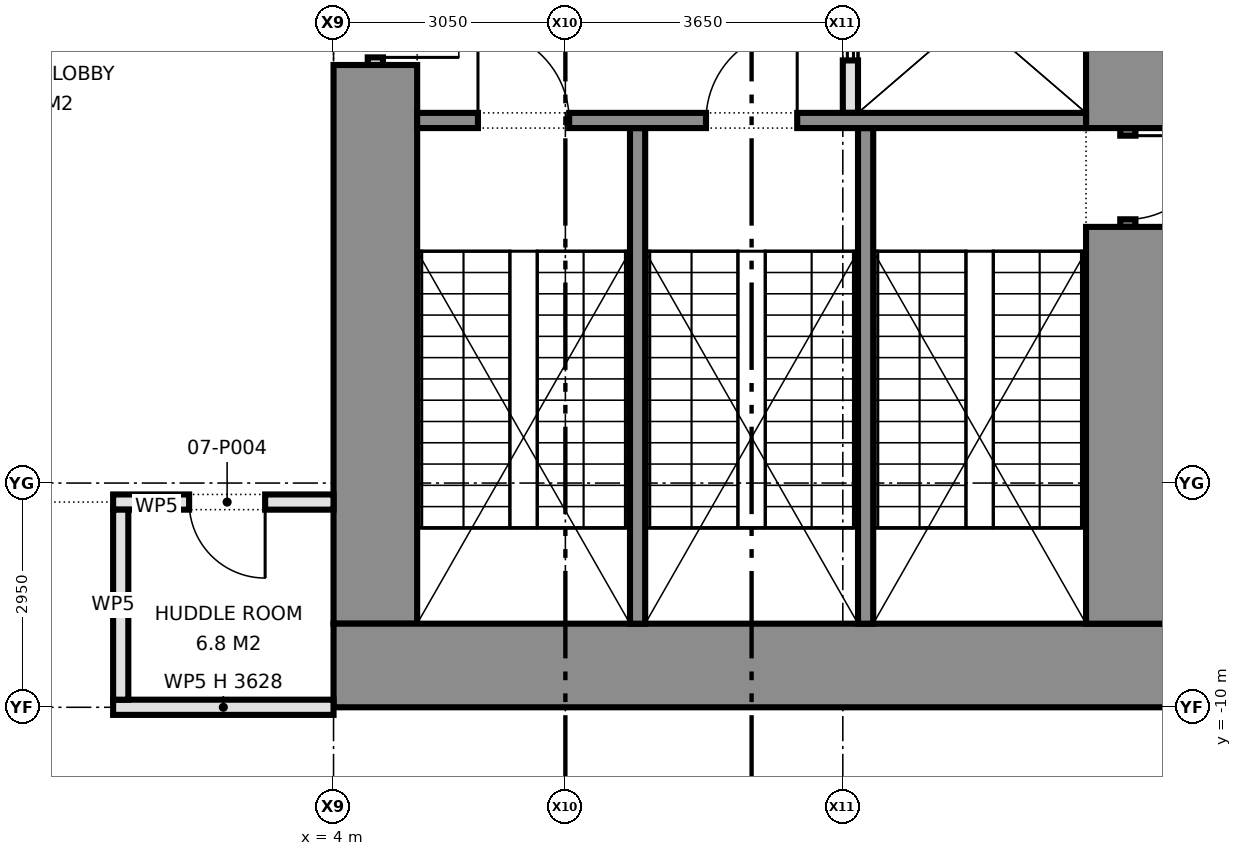
"""IFC4 building model, lengths in metres.
Left out: names, types, materials, properties, quantities, classifications, styles, units other than length and angle.
Written with IfcOpenShell. Run it as: python <this file> out.ifc"""

import sys

from ifc_helpers import new_model, si_unit, direction, frame, frame_2d, origin, place, context, subcontext, project, spatial, rectangle, extrude, element, fill, save


model = new_model("IFC4")
c1 = context("Model", 3, precision=1e-05, world=origin(), true_north=direction((0.0, 1.0)))
c2 = subcontext(c1, "Body", "Model", "MODEL_VIEW")
j1 = project(units=[si_unit("LENGTHUNIT", "METRE"), si_unit("PLANEANGLEUNIT", "RADIAN")], contexts=[c1])
p1 = place(None, origin())
s1 = spatial("IfcSite", under=j1, at=p1, CompositionType="ELEMENT")
p2 = place(p1, origin())
s2 = spatial("IfcBuilding", under=s1, at=p2, CompositionType="ELEMENT")
p3 = place(p2, frame((0.0, 0.0, 30.5)))
s3 = spatial("IfcBuildingStorey", under=s2, at=p3, CompositionType="ELEMENT", Elevation=30.5)
p4 = place(p3, frame((15.0, -9.45, 0.0), z_axis=(0.0, 0.0, 1.0), x_axis=(-1.0, 0.0, 0.0)))
e1 = element("IfcWall", 1, at=p4, inside=s3, PredefinedType="SHEAR", context=c2, shape_type="SweptSolid", body=[
    extrude(rectangle(XDim=11.0, YDim=1.1, at=frame_2d((5.5, 0.0))), origin(), (0.0, 0.0, 1.0), 4.575),
])
p5 = place(p3, frame((14.45, 3.75, 0.0), z_axis=(0.0, 0.0, 1.0), x_axis=(0.0, -1.0, 0.0)))
e2 = element("IfcWall", 2, at=p5, inside=s3, PredefinedType="SHEAR", context=c2, shape_type="SweptSolid", body=[
    extrude(rectangle(XDim=6.13, YDim=1.1, at=frame_2d((3.065, 0.0))), origin(), (0.0, 0.0, 1.0), 4.575),
])
p6 = place(p3, frame((14.45, -2.38, 0.0), z_axis=(0.0, 0.0, 1.0), x_axis=(0.0, -1.0, 0.0)))
e3 = element("IfcWall", 3, at=p6, inside=s3, PredefinedType="SHEAR", context=c2, shape_type="SweptSolid", body=[
    extrude(rectangle(XDim=1.3, YDim=0.2, at=frame_2d((0.65, 0.0))), origin(), (0.0, 0.0, 1.0), 2.4),
])
p7 = place(p6, frame((0.1, 0.0, 0.0)))
e4 = element("IfcOpeningElement", 4, at=p7, cuts=e3, PredefinedType="OPENING", context=c2, shape_type="SweptSolid", body=[
    extrude(rectangle(XDim=1.1, YDim=2.1, at=frame_2d((0.55, 1.05))), frame((0.0, 0.11, 0.0), z_axis=(0.0, -1.0, 0.0), x_axis=(1.0, 0.0, 0.0)), (0.0, 0.0, 1.0), 0.22),
])
p8 = place(p3, frame((14.45, -3.68, 0.0), z_axis=(0.0, 0.0, 1.0), x_axis=(0.0, -1.0, 0.0)))
e5 = element("IfcWall", 5, at=p8, inside=s3, PredefinedType="SHEAR", context=c2, shape_type="SweptSolid", body=[
    extrude(rectangle(XDim=5.22, YDim=1.1, at=frame_2d((2.61, 0.0))), origin(), (0.0, 0.0, 1.0), 4.575),
])
p9 = place(p3, frame((4.55, -0.25, 0.0), z_axis=(0.0, 0.0, 1.0), x_axis=(0.0, -1.0, 0.0)))
e6 = element("IfcWall", 6, at=p9, inside=s3, PredefinedType="PARTITIONING", context=c2, shape_type="SweptSolid", body=[
    extrude(rectangle(XDim=1.3, YDim=0.2, at=frame_2d((0.65, 0.0))), origin(), (0.0, 0.0, 1.0), 2.4),
])
p10 = place(p9, frame((0.1, 0.0, 0.0)))
e7 = element("IfcOpeningElement", 7, at=p10, cuts=e6, PredefinedType="OPENING", context=c2, shape_type="SweptSolid", body=[
    extrude(rectangle(XDim=1.1, YDim=2.1, at=frame_2d((0.55, 1.05))), frame((0.0, 0.11, 0.0), z_axis=(0.0, -1.0, 0.0), x_axis=(1.0, 0.0, 0.0)), (0.0, 0.0, 1.0), 0.22),
])
p11 = place(p3, frame((4.55, -1.55, 0.0), z_axis=(0.0, 0.0, 1.0), x_axis=(0.0, -1.0, 0.0)))
e8 = element("IfcWall", 8, at=p11, inside=s3, PredefinedType="SHEAR", context=c2, shape_type="SweptSolid", body=[
    extrude(rectangle(XDim=7.35, YDim=1.1, at=frame_2d((3.675, 0.0))), origin(), (0.0, 0.0, 1.0), 4.575),
])
p12 = place(p3, frame((10.8, 0.4, 0.0), z_axis=(0.0, 0.0, 1.0), x_axis=(0.0, -1.0, 0.0)))
e9 = element("IfcWall", 9, at=p12, inside=s3, PredefinedType="PARTITIONING", context=c2, shape_type="SweptSolid", body=[
    extrude(rectangle(XDim=2.58, YDim=0.2, at=frame_2d((1.29, 0.0))), origin(), (0.0, 0.0, 1.0), 4.575),
])
p13 = place(p12, frame((0.69, 0.0, 0.0)))
e10 = element("IfcOpeningElement", 10, at=p13, cuts=e9, PredefinedType="OPENING", context=c2, shape_type="SweptSolid", body=[
    extrude(rectangle(XDim=1.2, YDim=2.1, at=frame_2d((0.6, 1.05))), frame((0.0, 0.11, 0.0), z_axis=(0.0, -1.0, 0.0), x_axis=(1.0, 0.0, 0.0)), (0.0, 0.0, 1.0), 0.22),
])
p14 = place(p3, frame((13.9, -2.28, 0.0), z_axis=(0.0, 0.0, 1.0), x_axis=(-1.0, 0.0, 0.0)))
e11 = element("IfcWall", 11, at=p14, inside=s3, PredefinedType="SHEAR", context=c2, shape_type="SweptSolid", body=[
    extrude(rectangle(XDim=8.8, YDim=0.2, at=frame_2d((4.4, 0.0))), origin(), (0.0, 0.0, 1.0), 4.575),
])
p15 = place(p14, frame((3.8, 0.0, 0.0)))
e12 = element("IfcOpeningElement", 12, at=p15, cuts=e11, PredefinedType="OPENING", context=c2, shape_type="SweptSolid", body=[
    extrude(rectangle(XDim=1.2, YDim=2.1, at=frame_2d((0.6, 1.05))), frame((0.0, 0.11, 0.0), z_axis=(0.0, -1.0, 0.0), x_axis=(1.0, 0.0, 0.0)), (0.0, 0.0, 1.0), 0.22),
])
p16 = place(p14, frame((6.8, 0.0, 0.0)))
e13 = element("IfcOpeningElement", 13, at=p16, cuts=e11, PredefinedType="OPENING", context=c2, shape_type="SweptSolid", body=[
    extrude(rectangle(XDim=1.2, YDim=2.1, at=frame_2d((0.6, 1.05))), frame((0.0, 0.11, 0.0), z_axis=(0.0, -1.0, 0.0), x_axis=(1.0, 0.0, 0.0)), (0.0, 0.0, 1.0), 0.22),
])
for number, where, z_axis, x_axis in (
    (14, (11.0, -2.38, 0.0), (0.0, 0.0, 1.0), (0.0, -1.0, 0.0)),
    (15, (8.0, -2.38, 0.0), (0.0, 0.0, 1.0), (0.0, -1.0, 0.0)),
):
    element("IfcWall", number, at=place(p3, frame(where, z_axis=z_axis, x_axis=x_axis)), inside=s3, PredefinedType="SHEAR", context=c2, shape_type="SweptSolid", body=[
        extrude(rectangle(XDim=6.52, YDim=0.2, at=frame_2d((3.26, 0.0))), origin(), (0.0, 0.0, 1.0), 4.575),
    ])
p17 = place(p3, frame((1.1, -10.0, 0.0), z_axis=(0.0, 0.0, 1.0), x_axis=(1.0, 0.0, 0.0)))
e16 = element("IfcWall", 16, at=p17, inside=s3, PredefinedType="PARTITIONING", context=c2, shape_type="SweptSolid", body=[
    extrude(rectangle(XDim=2.9, YDim=0.2, at=frame_2d((1.45, 0.0))), origin(), (0.0, 0.0, 1.0), 3.628),
])
p18 = place(p3, frame((1.1, -7.3, 0.0), z_axis=(0.0, 0.0, 1.0), x_axis=(1.0, 0.0, 0.0)))
e17 = element("IfcWall", 17, at=p18, inside=s3, PredefinedType="PARTITIONING", context=c2, shape_type="SweptSolid", body=[
    extrude(rectangle(XDim=2.9, YDim=0.2, at=frame_2d((1.45, 0.0))), origin(), (0.0, 0.0, 1.0), 4.575),
])
p19 = place(p18, frame((1.0, 0.0, 0.0)))
e18 = element("IfcOpeningElement", 18, at=p19, cuts=e17, PredefinedType="OPENING", context=c2, shape_type="SweptSolid", body=[
    extrude(rectangle(XDim=1.0, YDim=2.1, at=frame_2d((0.5, 1.05))), frame((0.0, 0.11, 0.0), z_axis=(0.0, -1.0, 0.0), x_axis=(1.0, 0.0, 0.0)), (0.0, 0.0, 1.0), 0.22),
])
p20 = place(p3, frame((1.2, -9.9, 0.0), z_axis=(0.0, 0.0, 1.0), x_axis=(0.0, 1.0, 0.0)))
e19 = element("IfcWall", 19, at=p20, inside=s3, PredefinedType="PARTITIONING", context=c2, shape_type="SweptSolid", body=[
    extrude(rectangle(XDim=2.5, YDim=0.2, at=frame_2d((1.25, 0.0))), origin(), (0.0, 0.0, 1.0), 4.575),
])
p21 = place(p7, origin())
e20 = element("IfcDoor", 20, at=p21, inside=s3, OperationType="SINGLE_SWING_LEFT", PredefinedType="DOOR", context=c2, shape_type="SweptSolid", body=[
    extrude(rectangle(XDim=1.1, YDim=2.1, at=frame_2d((0.55, 1.05))), frame((0.0, 0.025, 0.0), z_axis=(0.0, -1.0, 0.0), x_axis=(1.0, 0.0, 0.0)), (0.0, 0.0, 1.0), 0.05),
])
fill(e4, e20)
p22 = place(p10, origin())
e21 = element("IfcDoor", 21, at=p22, inside=s3, OperationType="SINGLE_SWING_RIGHT", PredefinedType="DOOR", context=c2, shape_type="SweptSolid", body=[
    extrude(rectangle(XDim=1.1, YDim=2.1, at=frame_2d((0.55, 1.05))), frame((0.0, 0.025, 0.0), z_axis=(0.0, -1.0, 0.0), x_axis=(1.0, 0.0, 0.0)), (0.0, 0.0, 1.0), 0.05),
])
fill(e7, e21)
p23 = place(p13, origin())
e22 = element("IfcDoor", 22, at=p23, inside=s3, OperationType="DOUBLE_DOOR_SLIDING", PredefinedType="DOOR", context=c2, shape_type="SweptSolid", body=[
    extrude(rectangle(XDim=1.2, YDim=2.1, at=frame_2d((0.6, 1.05))), frame((0.0, 0.025, 0.0), z_axis=(0.0, -1.0, 0.0), x_axis=(1.0, 0.0, 0.0)), (0.0, 0.0, 1.0), 0.05),
])
fill(e10, e22)
p24 = place(p15, frame((1.2, 0.0, 0.0), z_axis=(0.0, 0.0, 1.0), x_axis=(-1.0, 0.0, 0.0)))
e23 = element("IfcDoor", 23, at=p24, inside=s3, OperationType="SINGLE_SWING_RIGHT", PredefinedType="DOOR", context=c2, shape_type="SweptSolid", body=[
    extrude(rectangle(XDim=1.2, YDim=2.1, at=frame_2d((0.6, 1.05))), frame((0.0, 0.025, 0.0), z_axis=(0.0, -1.0, 0.0), x_axis=(1.0, 0.0, 0.0)), (0.0, 0.0, 1.0), 0.05),
])
fill(e12, e23)
p25 = place(p16, frame((1.2, 0.0, 0.0), z_axis=(0.0, 0.0, 1.0), x_axis=(-1.0, 0.0, 0.0)))
e24 = element("IfcDoor", 24, at=p25, inside=s3, OperationType="SINGLE_SWING_LEFT", PredefinedType="DOOR", context=c2, shape_type="SweptSolid", body=[
    extrude(rectangle(XDim=1.2, YDim=2.1, at=frame_2d((0.6, 1.05))), frame((0.0, 0.025, 0.0), z_axis=(0.0, -1.0, 0.0), x_axis=(1.0, 0.0, 0.0)), (0.0, 0.0, 1.0), 0.05),
])
fill(e13, e24)
p26 = place(p19, frame((1.0, 0.0, 0.0), z_axis=(0.0, 0.0, 1.0), x_axis=(-1.0, 0.0, 0.0)))
e25 = element("IfcDoor", 25, at=p26, inside=s3, OperationType="SINGLE_SWING_LEFT", PredefinedType="DOOR", context=c2, shape_type="SweptSolid", body=[
    extrude(rectangle(XDim=1.0, YDim=2.1, at=frame_2d((0.5, 1.05))), frame((0.0, 0.025, 0.0), z_axis=(0.0, -1.0, 0.0), x_axis=(1.0, 0.0, 0.0)), (0.0, 0.0, 1.0), 0.05),
])
fill(e18, e25)
save(model, sys.argv[1])
